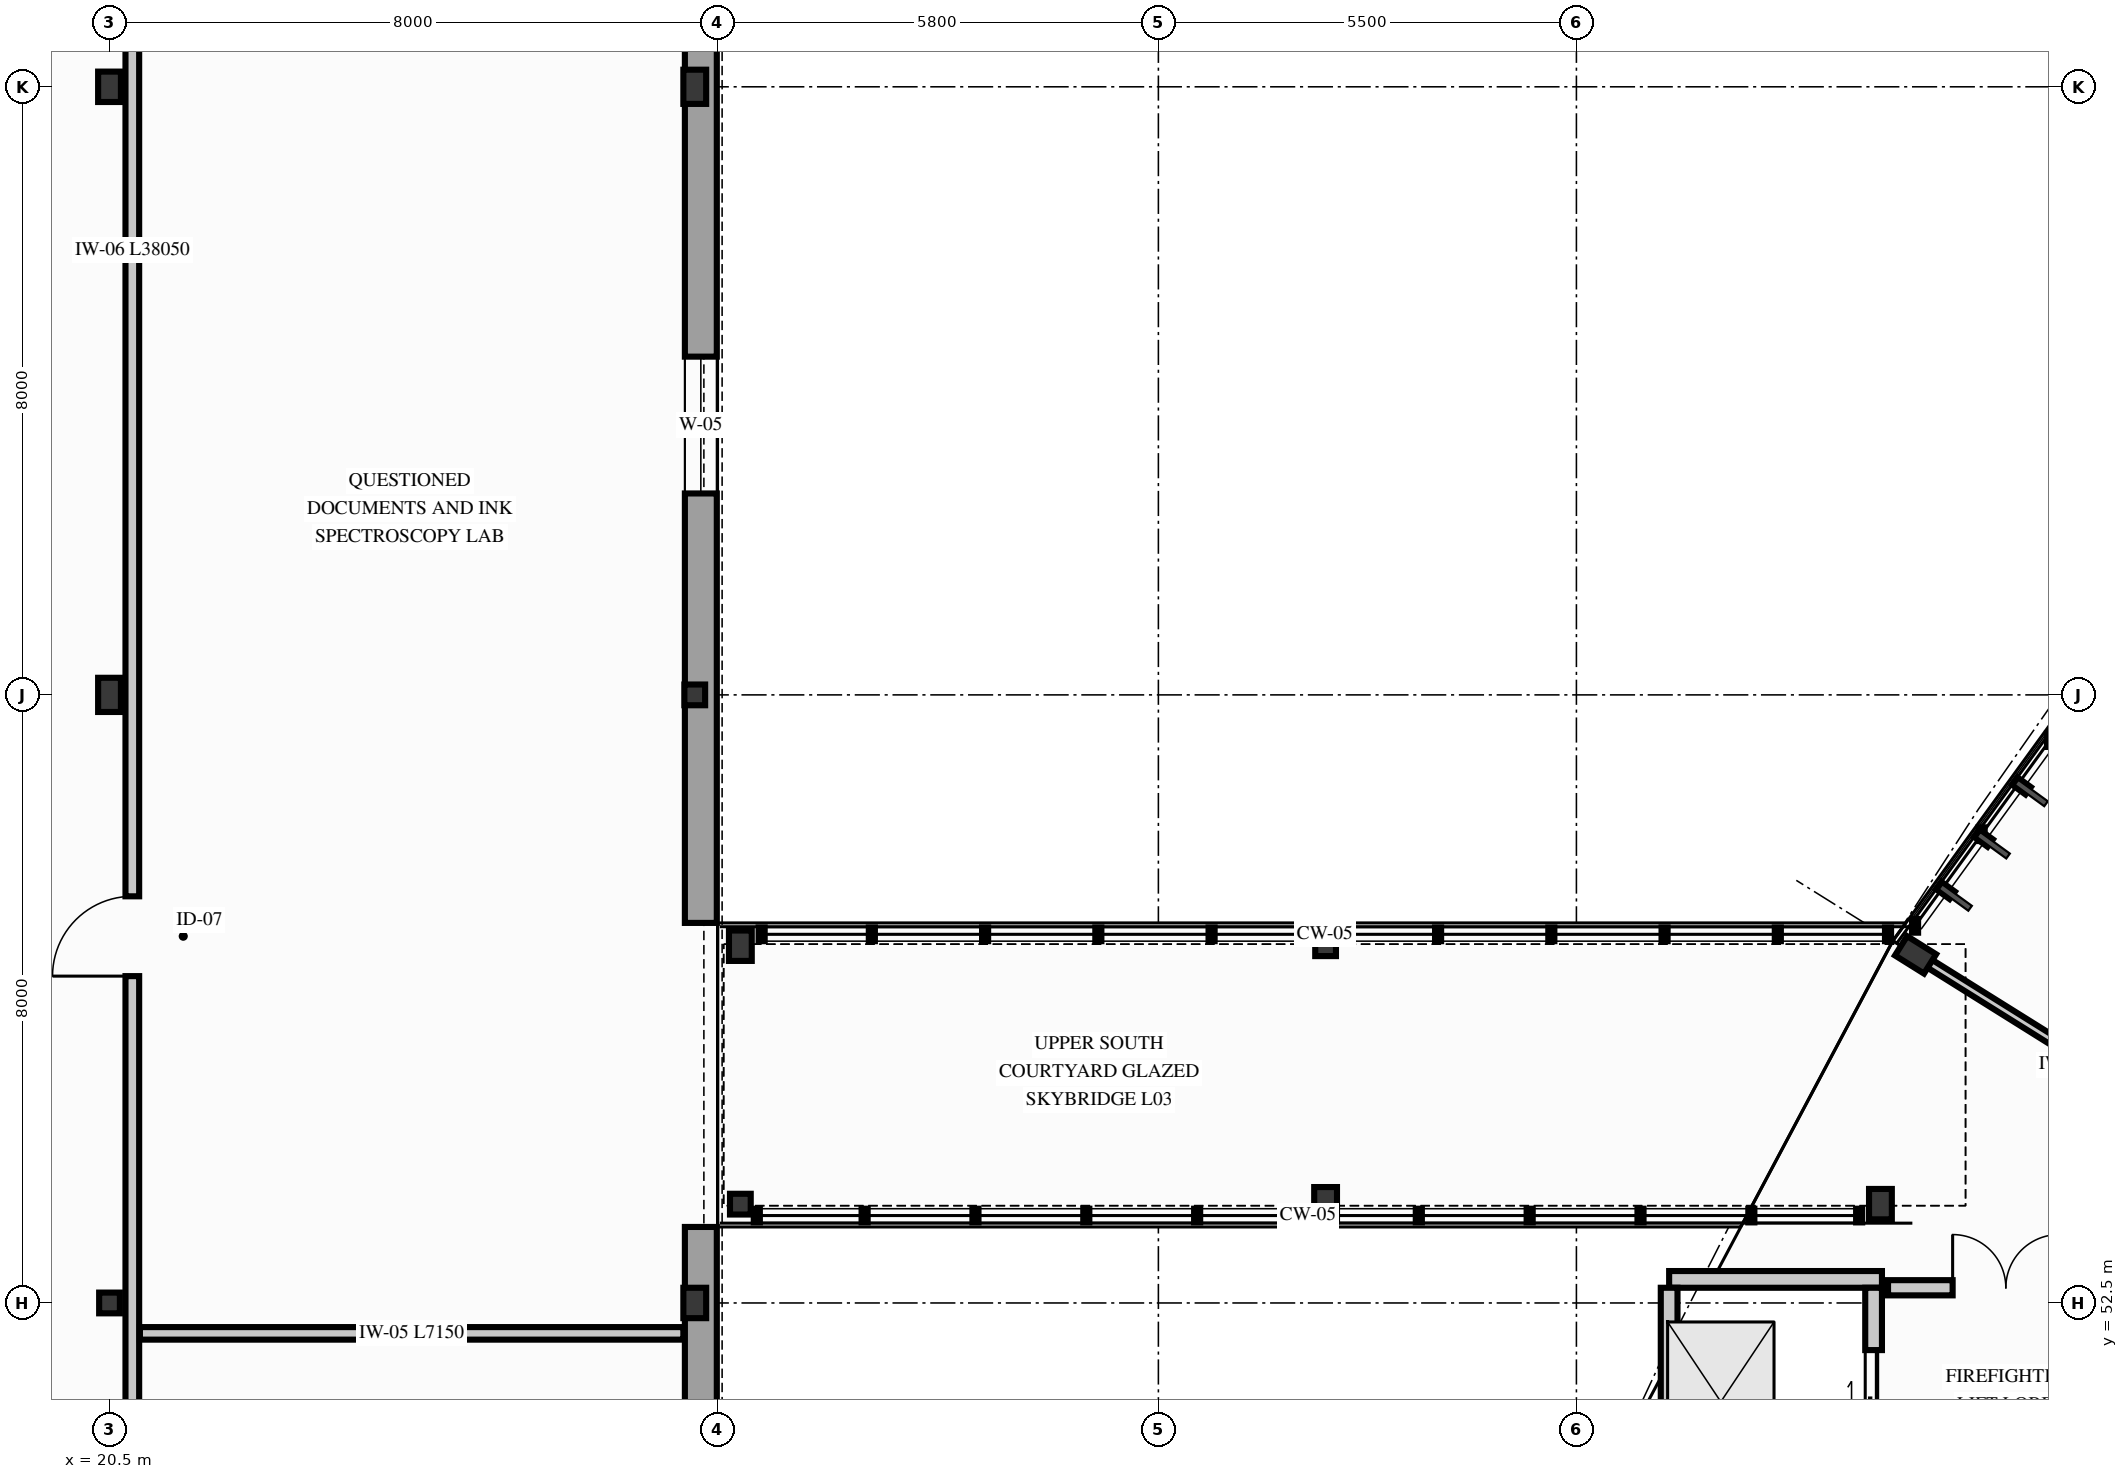
"""IFC4 building model, lengths in metres.
Left out: names, types, materials, properties, quantities, classifications, styles, units other than length and angle.
Written with IfcOpenShell. Run it as: python <this file> out.ifc"""

import sys

from ifc_helpers import new_model, si_unit, direction, frame, frame_2d, origin, origin_2d, place, context, subcontext, project, spatial, rectangle, hollow_circle, i_section, extrude, element, fill, save


model = new_model("IFC4")
c1 = context("Model", 3, precision=1e-05, world=origin(), true_north=direction((0.0, 1.0)))
c2 = subcontext(c1, "Body", "Model", "MODEL_VIEW")
j1 = project(units=[si_unit("LENGTHUNIT", "METRE"), si_unit("PLANEANGLEUNIT", "RADIAN")], contexts=[c1])
p1 = place(None, origin())
s1 = spatial("IfcSite", under=j1, at=p1, CompositionType="ELEMENT")
p2 = place(p1, origin())
s2 = spatial("IfcBuilding", under=s1, at=p2, CompositionType="ELEMENT")
p3 = place(p2, frame((0.0, 0.0, 13.5)))
s3 = spatial("IfcBuildingStorey", under=s2, at=p3, CompositionType="ELEMENT", Elevation=13.5)
p4 = place(p3, frame((44.262, 57.08, 0.0), z_axis=(0.0, 0.0, 1.0), x_axis=(0.529919264233, 0.848048096156, 0.0)))
e1 = element("IfcColumn", 1, at=p4, inside=s3, PredefinedType="COLUMN", context=c2, shape_type="SweptSolid", body=[
    extrude(i_section(OverallWidth=0.3, OverallDepth=0.45, WebThickness=0.014, FlangeThickness=0.026, FilletRadius=0.027, at=origin_2d()), origin(), (0.0, 0.0, 1.0), 4.2),
])
p5 = place(p3, frame((43.8, 53.8, 0.0), z_axis=(0.0, 0.0, 1.0), x_axis=(1.0, 0.0, 0.0)))
e2 = element("IfcColumn", 2, at=p5, inside=s3, PredefinedType="COLUMN", context=c2, shape_type="SweptSolid", body=[
    extrude(i_section(OverallWidth=0.3, OverallDepth=0.4, WebThickness=0.013, FlangeThickness=0.024, FilletRadius=0.027, at=origin_2d()), origin(), (0.0, 0.0, 1.0), 3.94),
])
p6 = place(p3, frame((36.5, 57.2, 0.0), z_axis=(0.0, 0.0, 1.0), x_axis=(1.0, 0.0, 0.0)))
e3 = element("IfcColumn", 3, at=p6, inside=s3, PredefinedType="COLUMN", context=c2, shape_type="SweptSolid", body=[
    extrude(hollow_circle(Radius=0.136, WallThickness=0.012, at=origin_2d()), origin(), (0.0, 0.0, 1.0), 3.94),
])
p7 = place(p3, frame((36.5, 53.8, 0.0), z_axis=(0.0, 0.0, 1.0), x_axis=(1.0, 0.0, 0.0)))
e4 = element("IfcColumn", 4, at=p7, inside=s3, PredefinedType="COLUMN", context=c2, shape_type="SweptSolid", body=[
    extrude(i_section(OverallWidth=0.3, OverallDepth=0.45, WebThickness=0.014, FlangeThickness=0.026, FilletRadius=0.027, at=origin_2d()), origin(), (0.0, 0.0, 1.0), 3.94),
])
p8 = place(p3, frame((28.8, 57.2, 0.0), z_axis=(0.0, 0.0, 1.0), x_axis=(1.0, 0.0, 0.0)))
e5 = element("IfcColumn", 5, at=p8, inside=s3, PredefinedType="COLUMN", context=c2, shape_type="SweptSolid", body=[
    extrude(i_section(OverallWidth=0.3, OverallDepth=0.4, WebThickness=0.013, FlangeThickness=0.024, FilletRadius=0.027, at=origin_2d()), origin(), (0.0, 0.0, 1.0), 3.94),
])
p9 = place(p3, frame((28.8, 53.8, 0.0), z_axis=(0.0, 0.0, 1.0), x_axis=(1.0, 0.0, 0.0)))
e6 = element("IfcColumn", 6, at=p9, inside=s3, PredefinedType="COLUMN", context=c2, shape_type="SweptSolid", body=[
    extrude(hollow_circle(Radius=0.136, WallThickness=0.012, at=origin_2d()), origin(), (0.0, 0.0, 1.0), 3.94),
])
p10 = place(p3, frame((20.5, 52.5, 0.0), z_axis=(0.0, 0.0, 1.0), x_axis=(1.0, 0.0, 0.0)))
e7 = element("IfcColumn", 7, at=p10, inside=s3, PredefinedType="COLUMN", context=c2, shape_type="SweptSolid", body=[
    extrude(hollow_circle(Radius=0.136, WallThickness=0.012, at=origin_2d()), origin(), (0.0, 0.0, 1.0), 4.2),
])
p11 = place(p3, frame((20.5, 60.5, 0.0), z_axis=(0.0, 0.0, 1.0), x_axis=(1.0, 0.0, 0.0)))
e8 = element("IfcColumn", 8, at=p11, inside=s3, PredefinedType="COLUMN", context=c2, shape_type="SweptSolid", body=[
    extrude(i_section(OverallWidth=0.3, OverallDepth=0.45, WebThickness=0.014, FlangeThickness=0.026, FilletRadius=0.027, at=origin_2d()), origin(), (0.0, 0.0, 1.0), 4.2),
])
for number, where, z_axis, x_axis in (
    (9, (20.5, 68.5, 0.0), (0.0, 0.0, 1.0), (1.0, 0.0, 0.0)),
    (10, (28.2, 52.5, 0.0), (0.0, 0.0, 1.0), (1.0, 0.0, 0.0)),
):
    element("IfcColumn", number, at=place(p3, frame(where, z_axis=z_axis, x_axis=x_axis)), inside=s3, PredefinedType="COLUMN", context=c2, shape_type="SweptSolid", body=[
        extrude(i_section(OverallWidth=0.3, OverallDepth=0.4, WebThickness=0.013, FlangeThickness=0.024, FilletRadius=0.027, at=origin_2d()), origin(), (0.0, 0.0, 1.0), 4.2),
    ])
p12 = place(p3, frame((28.2, 60.5, 0.0), z_axis=(0.0, 0.0, 1.0), x_axis=(1.0, 0.0, 0.0)))
e11 = element("IfcColumn", 11, at=p12, inside=s3, PredefinedType="COLUMN", context=c2, shape_type="SweptSolid", body=[
    extrude(hollow_circle(Radius=0.136, WallThickness=0.012, at=origin_2d()), origin(), (0.0, 0.0, 1.0), 4.2),
])
p13 = place(p3, frame((28.2, 68.5, 0.0), z_axis=(0.0, 0.0, 1.0), x_axis=(1.0, 0.0, 0.0)))
e12 = element("IfcColumn", 12, at=p13, inside=s3, PredefinedType="COLUMN", context=c2, shape_type="SweptSolid", body=[
    extrude(i_section(OverallWidth=0.3, OverallDepth=0.45, WebThickness=0.014, FlangeThickness=0.026, FilletRadius=0.027, at=origin_2d()), origin(), (0.0, 0.0, 1.0), 4.2),
])
p14 = place(p3, frame((28.28, 36.5, 0.0), z_axis=(0.0, 0.0, 1.0), x_axis=(0.0, 1.0, 0.0)))
e13 = element("IfcWall", 13, at=p14, inside=s3, PredefinedType="SOLIDWALL", context=c2, shape_type="SweptSolid", body=[
    extrude(rectangle(XDim=17.0, YDim=0.42, at=frame_2d((8.5, 0.0))), origin(), (0.0, 0.0, 1.0), 3.72),
])
p15 = place(p14, frame((1.65, 0.0, 0.74)))
e14 = element("IfcOpeningElement", 14, at=p15, cuts=e13, PredefinedType="OPENING", context=c2, shape_type="SweptSolid", body=[
    extrude(rectangle(XDim=1.6, YDim=2.4, at=frame_2d((0.8, 1.2))), frame((0.0, 0.22, 0.0), z_axis=(0.0, -1.0, 0.0), x_axis=(1.0, 0.0, 0.0)), (0.0, 0.0, 1.0), 0.44),
])
p16 = place(p14, frame((5.65, 0.0, 0.74)))
e15 = element("IfcOpeningElement", 15, at=p16, cuts=e13, PredefinedType="OPENING", context=c2, shape_type="SweptSolid", body=[
    extrude(rectangle(XDim=1.8, YDim=2.4, at=frame_2d((0.9, 1.2))), frame((0.0, 0.22, 0.0), z_axis=(0.0, -1.0, 0.0), x_axis=(1.0, 0.0, 0.0)), (0.0, 0.0, 1.0), 0.44),
])
p17 = place(p14, frame((9.65, 0.0, 0.84)))
e16 = element("IfcOpeningElement", 16, at=p17, cuts=e13, PredefinedType="OPENING", context=c2, shape_type="SweptSolid", body=[
    extrude(rectangle(XDim=1.5, YDim=2.3, at=frame_2d((0.75, 1.15))), frame((0.0, 0.22, 0.0), z_axis=(0.0, -1.0, 0.0), x_axis=(1.0, 0.0, 0.0)), (0.0, 0.0, 1.0), 0.44),
])
p18 = place(p3, frame((28.28, 57.5, 0.0), z_axis=(0.0, 0.0, 1.0), x_axis=(0.0, 1.0, 0.0)))
e17 = element("IfcWall", 17, at=p18, inside=s3, PredefinedType="SOLIDWALL", context=c2, shape_type="SweptSolid", body=[
    extrude(rectangle(XDim=26.0, YDim=0.42, at=frame_2d((13.0, 0.0))), origin(), (0.0, 0.0, 1.0), 3.72),
])
p19 = place(p18, frame((5.65, 0.0, 0.74)))
e18 = element("IfcOpeningElement", 18, at=p19, cuts=e17, PredefinedType="OPENING", context=c2, shape_type="SweptSolid", body=[
    extrude(rectangle(XDim=1.8, YDim=2.4, at=frame_2d((0.9, 1.2))), frame((0.0, 0.22, 0.0), z_axis=(0.0, -1.0, 0.0), x_axis=(1.0, 0.0, 0.0)), (0.0, 0.0, 1.0), 0.44),
])
p20 = place(p18, frame((13.65, 0.0, 0.85)))
e19 = element("IfcOpeningElement", 19, at=p20, cuts=e17, PredefinedType="OPENING", context=c2, shape_type="SweptSolid", body=[
    extrude(rectangle(XDim=1.4, YDim=2.2, at=frame_2d((0.7, 1.1))), frame((0.0, 0.22, 0.0), z_axis=(0.0, -1.0, 0.0), x_axis=(1.0, 0.0, 0.0)), (0.0, 0.0, 1.0), 0.44),
])
p21 = place(p18, frame((21.65, 0.0, 0.74)))
e20 = element("IfcOpeningElement", 20, at=p21, cuts=e17, PredefinedType="OPENING", context=c2, shape_type="SweptSolid", body=[
    extrude(rectangle(XDim=2.4, YDim=2.4, at=frame_2d((1.2, 1.2))), frame((0.0, 0.22, 0.0), z_axis=(0.0, -1.0, 0.0), x_axis=(1.0, 0.0, 0.0)), (0.0, 0.0, 1.0), 0.44),
])
p22 = place(p3, frame((41.02, 52.81, 0.0), z_axis=(0.0, 0.0, 1.0), x_axis=(1.0, 0.0, 0.0)))
e21 = element("IfcWall", 21, at=p22, inside=s3, PredefinedType="PARTITIONING", context=c2, shape_type="SweptSolid", body=[
    extrude(rectangle(XDim=2.8, YDim=0.22, at=frame_2d((1.4, 0.0))), origin(), (0.0, 0.0, 1.0), 3.98),
])
p23 = place(p3, frame((41.02, 49.76, 0.0), z_axis=(0.0, 0.0, 1.0), x_axis=(0.0, 1.0, 0.0)))
e22 = element("IfcWall", 22, at=p23, inside=s3, PredefinedType="PARTITIONING", context=c2, shape_type="SweptSolid", body=[
    extrude(rectangle(XDim=2.94, YDim=0.22, at=frame_2d((1.47, 0.0))), origin(), (0.0, 0.0, 1.0), 3.98),
])
p24 = place(p3, frame((43.71, 49.76, 0.0), z_axis=(0.0, 0.0, 1.0), x_axis=(0.0, 1.0, 0.0)))
e23 = element("IfcWall", 23, at=p24, inside=s3, PredefinedType="PARTITIONING", context=c2, shape_type="SweptSolid", body=[
    extrude(rectangle(XDim=2.94, YDim=0.22, at=frame_2d((1.47, 0.0))), origin(), (0.0, 0.0, 1.0), 3.98),
])
p25 = place(p24, frame((0.82, 0.0, 0.0)))
e24 = element("IfcOpeningElement", 24, at=p25, cuts=e23, PredefinedType="OPENING", context=c2, shape_type="SweptSolid", body=[
    extrude(rectangle(XDim=1.3, YDim=2.2, at=frame_2d((0.65, 1.1))), frame((0.0, 0.12, 0.0), z_axis=(0.0, -1.0, 0.0), x_axis=(1.0, 0.0, 0.0)), (0.0, 0.0, 1.0), 0.24),
])
p26 = place(p3, frame((43.9, 52.7, 0.0), z_axis=(0.0, 0.0, 1.0), x_axis=(1.0, 0.0, 0.0)))
e25 = element("IfcWall", 25, at=p26, inside=s3, PredefinedType="PARTITIONING", context=c2, shape_type="SweptSolid", body=[
    extrude(rectangle(XDim=3.4, YDim=0.2, at=frame_2d((1.7, 0.0))), origin(), (0.0, 0.0, 1.0), 3.98),
])
p27 = place(p26, frame((0.85, 0.0, 0.0)))
e26 = element("IfcOpeningElement", 26, at=p27, cuts=e25, PredefinedType="OPENING", context=c2, shape_type="SweptSolid", body=[
    extrude(rectangle(XDim=1.4, YDim=2.25, at=frame_2d((0.7, 1.125))), frame((0.0, 0.11, 0.0), z_axis=(0.0, -1.0, 0.0), x_axis=(1.0, 0.0, 0.0)), (0.0, 0.0, 1.0), 0.22),
])
p28 = place(p3, frame((20.8, 36.8, 0.0), z_axis=(0.0, 0.0, 1.0), x_axis=(0.0, 1.0, 0.0)))
e27 = element("IfcWall", 27, at=p28, inside=s3, PredefinedType="PARTITIONING", context=c2, shape_type="SweptSolid", body=[
    extrude(rectangle(XDim=38.05, YDim=0.18, at=frame_2d((19.025, 0.0))), origin(), (0.0, 0.0, 1.0), 3.718),
])
p29 = place(p28, frame((5.65, 0.0, 0.0)))
e28 = element("IfcOpeningElement", 28, at=p29, cuts=e27, PredefinedType="OPENING", context=c2, shape_type="SweptSolid", body=[
    extrude(rectangle(XDim=1.08, YDim=2.22, at=frame_2d((0.54, 1.11))), frame((0.0, 0.1, 0.0), z_axis=(0.0, -1.0, 0.0), x_axis=(1.0, 0.0, 0.0)), (0.0, 0.0, 1.0), 0.2),
])
p30 = place(p28, frame((20.0, 0.0, 0.0)))
e29 = element("IfcOpeningElement", 29, at=p30, cuts=e27, PredefinedType="OPENING", context=c2, shape_type="SweptSolid", body=[
    extrude(rectangle(XDim=1.05, YDim=2.2, at=frame_2d((0.525, 1.1))), frame((0.0, 0.1, 0.0), z_axis=(0.0, -1.0, 0.0), x_axis=(1.0, 0.0, 0.0)), (0.0, 0.0, 1.0), 0.2),
])
p31 = place(p3, frame((20.9, 52.1, 0.0), z_axis=(0.0, 0.0, 1.0), x_axis=(1.0, 0.0, 0.0)))
e30 = element("IfcWall", 30, at=p31, inside=s3, PredefinedType="PARTITIONING", context=c2, shape_type="SweptSolid", body=[
    extrude(rectangle(XDim=7.15, YDim=0.165, at=frame_2d((3.575, 0.0))), origin(), (0.0, 0.0, 1.0), 3.98),
])
p32 = place(p3, frame((48.757, 54.271, 0.0), z_axis=(0.0, 0.0, 1.0), x_axis=(-0.848054228257, 0.529909450694, 0.0)))
e31 = element("IfcWall", 31, at=p32, inside=s3, PredefinedType="PARTITIONING", context=c2, shape_type="SweptSolid", body=[
    extrude(rectangle(XDim=5.15, YDim=0.12, at=frame_2d((2.575, 0.0))), origin(), (0.0, 0.0, 1.0), 3.55),
])
p33 = place(p19, origin())
e32 = element("IfcWindow", 32, at=p33, inside=s3, PartitioningType="SINGLE_PANEL", PredefinedType="WINDOW", context=c2, shape_type="SweptSolid", body=[
    extrude(rectangle(XDim=1.8, YDim=2.4, at=frame_2d((0.9, 1.2))), frame((0.0, 0.03, 0.0), z_axis=(0.0, -1.0, 0.0), x_axis=(1.0, 0.0, 0.0)), (0.0, 0.0, 1.0), 0.06),
])
fill(e18, e32)
p34 = place(p25, origin())
e33 = element("IfcDoor", 33, at=p34, inside=s3, OperationType="DOUBLE_DOOR_SLIDING", PredefinedType="DOOR", context=c2, shape_type="SweptSolid", body=[
    extrude(rectangle(XDim=1.3, YDim=2.2, at=frame_2d((0.65, 1.1))), frame((0.0, 0.025, 0.0), z_axis=(0.0, -1.0, 0.0), x_axis=(1.0, 0.0, 0.0)), (0.0, 0.0, 1.0), 0.05),
])
fill(e24, e33)
p35 = place(p27, origin())
e34 = element("IfcDoor", 34, at=p35, inside=s3, OperationType="DOUBLE_DOOR_SINGLE_SWING", PredefinedType="DOOR", context=c2, shape_type="SweptSolid", body=[
    extrude(rectangle(XDim=1.4, YDim=2.25, at=frame_2d((0.7, 1.125))), frame((0.0, 0.025, 0.0), z_axis=(0.0, -1.0, 0.0), x_axis=(1.0, 0.0, 0.0)), (0.0, 0.0, 1.0), 0.05),
])
fill(e26, e34)
p36 = place(p30, origin())
e35 = element("IfcDoor", 35, at=p36, inside=s3, OperationType="SINGLE_SWING_LEFT", PredefinedType="DOOR", context=c2, shape_type="SweptSolid", body=[
    extrude(rectangle(XDim=1.05, YDim=2.2, at=frame_2d((0.525, 1.1))), frame((0.0, 0.025, 0.0), z_axis=(0.0, -1.0, 0.0), x_axis=(1.0, 0.0, 0.0)), (0.0, 0.0, 1.0), 0.05),
])
fill(e29, e35)
save(model, sys.argv[1])
